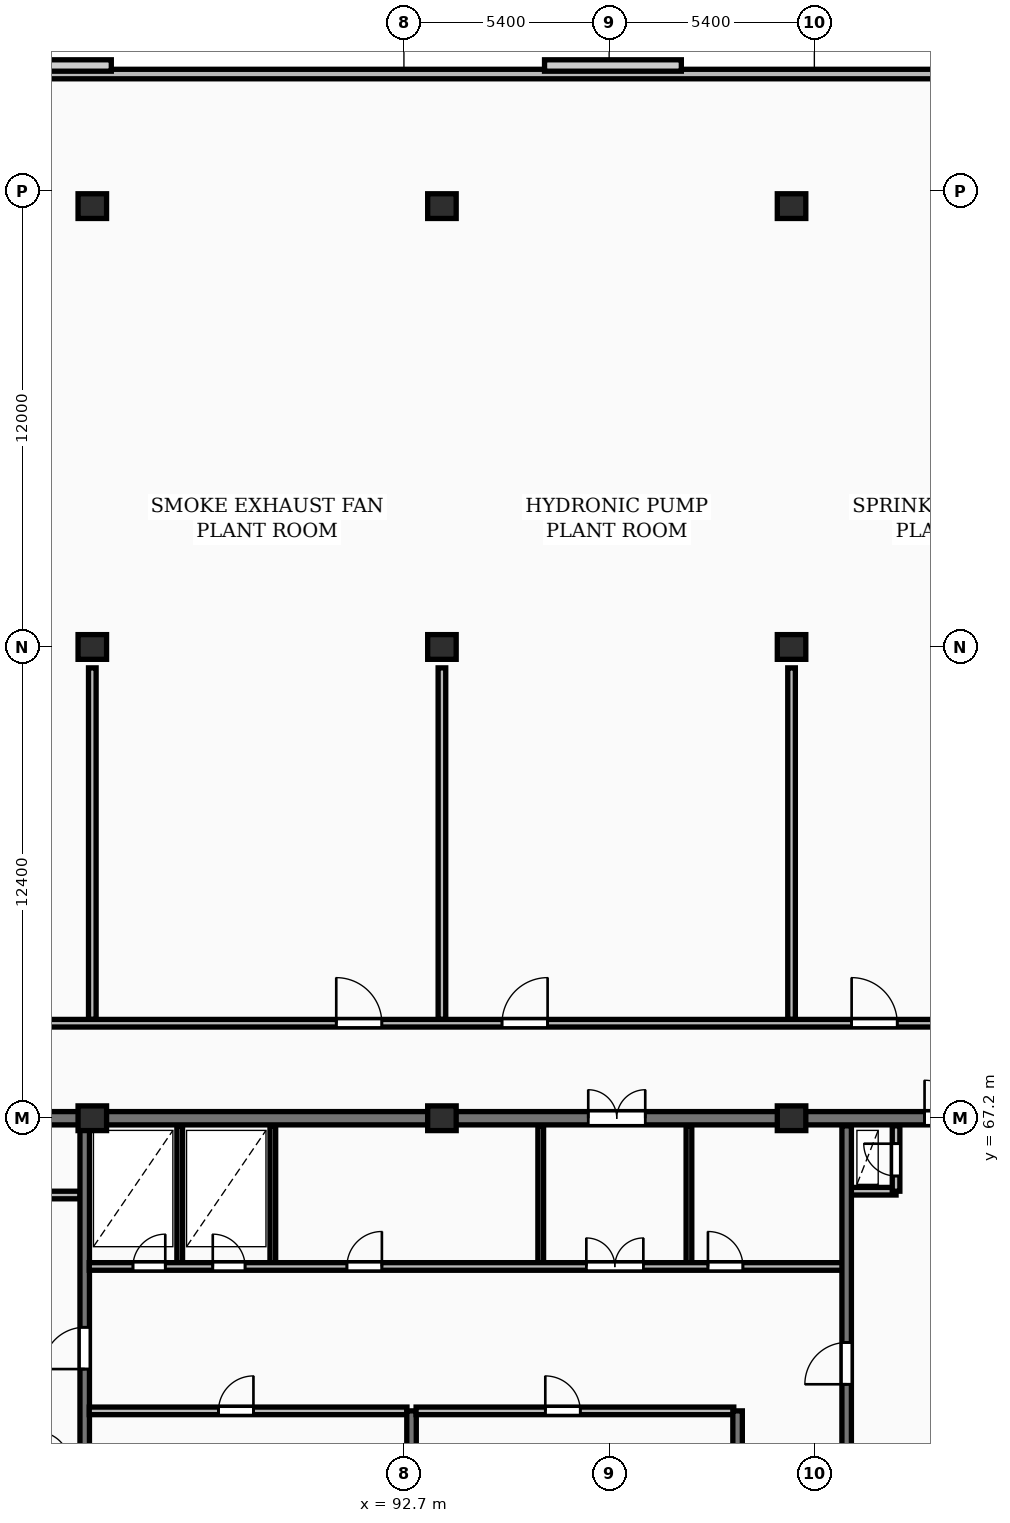
"""IFC4 building model, lengths in metres.
Left out: names, types, materials, properties, quantities, classifications, styles, units other than length and angle.
Written with IfcOpenShell. Run it as: python <this file> out.ifc"""

import sys

from ifc_helpers import new_model, si_unit, direction, frame, frame_2d, origin, origin_2d, place, context, subcontext, project, spatial, rectangle, extrude, element, fill, save


model = new_model("IFC4")
c1 = context("Model", 3, precision=1e-05, world=origin(), true_north=direction((0.0, 1.0)))
c2 = subcontext(c1, "Body", "Model", "MODEL_VIEW")
j1 = project(units=[si_unit("LENGTHUNIT", "METRE"), si_unit("PLANEANGLEUNIT", "RADIAN")], contexts=[c1])
p1 = place(None, origin())
s1 = spatial("IfcSite", under=j1, at=p1, CompositionType="ELEMENT")
p2 = place(p1, origin())
s2 = spatial("IfcBuilding", under=s1, at=p2, CompositionType="ELEMENT")
p3 = place(p2, frame((0.0, 0.0, 259.7)))
s3 = spatial("IfcBuildingStorey", under=s2, at=p3, CompositionType="ELEMENT", Elevation=259.7)
for number, where, z_axis, x_axis in (
    (1, (84.5, 67.2, 0.0), (0.0, 0.0, 1.0), (1.0, 0.0, 0.0)),
    (2, (84.5, 79.6, 0.0), (0.0, 0.0, 1.0), (1.0, 0.0, 0.0)),
    (3, (84.5, 91.2, 0.0), (0.0, 0.0, 1.0), (1.0, 0.0, 0.0)),
    (4, (93.7, 67.2, 0.0), (0.0, 0.0, 1.0), (1.0, 0.0, 0.0)),
    (5, (93.7, 79.6, 0.0), (0.0, 0.0, 1.0), (1.0, 0.0, 0.0)),
    (6, (93.7, 91.2, 0.0), (0.0, 0.0, 1.0), (1.0, 0.0, 0.0)),
    (7, (102.9, 67.2, 0.0), (0.0, 0.0, 1.0), (1.0, 0.0, 0.0)),
    (8, (102.9, 79.6, 0.0), (0.0, 0.0, 1.0), (1.0, 0.0, 0.0)),
    (9, (102.9, 91.2, 0.0), (0.0, 0.0, 1.0), (1.0, 0.0, 0.0)),
):
    element("IfcColumn", number, at=place(p3, frame(where, z_axis=z_axis, x_axis=x_axis)), inside=s3, PredefinedType="COLUMN", context=c2, shape_type="SweptSolid", body=[
        extrude(rectangle(XDim=0.75, YDim=0.65, at=origin_2d()), origin(), (0.0, 0.0, 1.0), 4.5),
    ])
p4 = place(p3, frame((128.4, 94.675, 0.0), z_axis=(0.0, 0.0, 1.0), x_axis=(-1.0, 0.0, 0.0)))
e10 = element("IfcWall", 10, at=p4, inside=s3, PredefinedType="SHEAR", context=c2, shape_type="SweptSolid", body=[
    extrude(rectangle(XDim=68.6, YDim=0.25, at=frame_2d((34.3, 0.0))), origin(), (0.0, 0.0, 1.0), 4.23),
])
p5 = place(p3, frame((75.95, 67.2, 0.0), z_axis=(0.0, 0.0, 1.0), x_axis=(1.0, 0.0, 0.0)))
e11 = element("IfcWall", 11, at=p5, inside=s3, PredefinedType="SHEAR", context=c2, shape_type="SweptSolid", body=[
    extrude(rectangle(XDim=36.3, YDim=0.35, at=frame_2d((18.15, 0.0))), origin(), (0.0, 0.0, 1.0), 4.5),
])
p6 = place(p5, frame((5.25, 0.0, 0.0)))
e12 = element("IfcOpeningElement", 12, at=p6, cuts=e11, PredefinedType="OPENING", context=c2, shape_type="SweptSolid", body=[
    extrude(rectangle(XDim=1.0, YDim=2.15, at=frame_2d((0.5, 1.075))), frame((0.0, 0.185, 0.0), z_axis=(0.0, -1.0, 0.0), x_axis=(1.0, 0.0, 0.0)), (0.0, 0.0, 1.0), 0.37),
])
p7 = place(p5, frame((21.6, 0.0, 0.0)))
e13 = element("IfcOpeningElement", 13, at=p7, cuts=e11, PredefinedType="OPENING", context=c2, shape_type="SweptSolid", body=[
    extrude(rectangle(XDim=1.5, YDim=2.2, at=frame_2d((0.75, 1.1))), frame((0.0, 0.185, 0.0), z_axis=(0.0, -1.0, 0.0), x_axis=(1.0, 0.0, 0.0)), (0.0, 0.0, 1.0), 0.37),
])
p8 = place(p5, frame((30.45, 0.0, 0.0)))
e14 = element("IfcOpeningElement", 14, at=p8, cuts=e11, PredefinedType="OPENING", context=c2, shape_type="SweptSolid", body=[
    extrude(rectangle(XDim=1.0, YDim=2.15, at=frame_2d((0.5, 1.075))), frame((0.0, 0.185, 0.0), z_axis=(0.0, -1.0, 0.0), x_axis=(1.0, 0.0, 0.0)), (0.0, 0.0, 1.0), 0.37),
])
p9 = place(p3, frame((79.79, 65.18, 0.0), z_axis=(0.0, 0.0, 1.0), x_axis=(1.0, 0.0, 0.0)))
e15 = element("IfcWall", 15, at=p9, inside=s3, PredefinedType="PARTITIONING", context=c2, shape_type="SweptSolid", body=[
    extrude(rectangle(XDim=4.39, YDim=0.2, at=frame_2d((2.195, 0.0))), origin(), (0.0, 0.0, 1.0), 4.23),
])
p10 = place(p9, frame((1.5, 0.0, 0.0)))
e16 = element("IfcOpeningElement", 16, at=p10, cuts=e15, PredefinedType="OPENING", context=c2, shape_type="SweptSolid", body=[
    extrude(rectangle(XDim=1.1, YDim=2.1, at=frame_2d((0.55, 1.05))), frame((0.0, 0.11, 0.0), z_axis=(0.0, -1.0, 0.0), x_axis=(1.0, 0.0, 0.0)), (0.0, 0.0, 1.0), 0.22),
])
p11 = place(p3, frame((84.3, 55.4, 0.0), z_axis=(0.0, 0.0, 1.0), x_axis=(0.0, 1.0, 0.0)))
e17 = element("IfcWall", 17, at=p11, inside=s3, PredefinedType="SHEAR", context=c2, shape_type="SweptSolid", body=[
    extrude(rectangle(XDim=11.6, YDim=0.25, at=frame_2d((5.8, 0.0))), origin(), (0.0, 0.0, 1.0), 4.5),
])
p12 = place(p11, frame((5.2, 0.0, 0.0)))
e18 = element("IfcOpeningElement", 18, at=p12, cuts=e17, PredefinedType="OPENING", context=c2, shape_type="SweptSolid", body=[
    extrude(rectangle(XDim=1.1, YDim=2.1, at=frame_2d((0.55, 1.05))), frame((0.0, 0.135, 0.0), z_axis=(0.0, -1.0, 0.0), x_axis=(1.0, 0.0, 0.0)), (0.0, 0.0, 1.0), 0.27),
])
p13 = place(p3, frame((84.42, 59.5, 0.0), z_axis=(0.0, 0.0, 1.0), x_axis=(1.0, 0.0, 0.0)))
e19 = element("IfcWall", 19, at=p13, inside=s3, PredefinedType="PARTITIONING", context=c2, shape_type="SweptSolid", body=[
    extrude(rectangle(XDim=8.36, YDim=0.2, at=frame_2d((4.18, 0.0))), origin(), (0.0, 0.0, 1.0), 4.23),
])
p14 = place(p13, frame((3.4, 0.0, 0.0)))
e20 = element("IfcOpeningElement", 20, at=p14, cuts=e19, PredefinedType="OPENING", context=c2, shape_type="SweptSolid", body=[
    extrude(rectangle(XDim=0.92, YDim=2.08, at=frame_2d((0.46, 1.04))), frame((0.0, 0.11, 0.0), z_axis=(0.0, -1.0, 0.0), x_axis=(1.0, 0.0, 0.0)), (0.0, 0.0, 1.0), 0.22),
])
p15 = place(p3, frame((92.9, 55.4, 0.0), z_axis=(0.0, 0.0, 1.0), x_axis=(0.0, 1.0, 0.0)))
e21 = element("IfcWall", 21, at=p15, inside=s3, PredefinedType="SHEAR", context=c2, shape_type="SweptSolid", body=[
    extrude(rectangle(XDim=4.1, YDim=0.25, at=frame_2d((2.05, 0.0))), origin(), (0.0, 0.0, 1.0), 4.5),
])
p16 = place(p3, frame((93.02, 59.5, 0.0), z_axis=(0.0, 0.0, 1.0), x_axis=(1.0, 0.0, 0.0)))
e22 = element("IfcWall", 22, at=p16, inside=s3, PredefinedType="PARTITIONING", context=c2, shape_type="SweptSolid", body=[
    extrude(rectangle(XDim=8.36, YDim=0.2, at=frame_2d((4.18, 0.0))), origin(), (0.0, 0.0, 1.0), 4.23),
])
p17 = place(p16, frame((3.4, 0.0, 0.0)))
e23 = element("IfcOpeningElement", 23, at=p17, cuts=e22, PredefinedType="OPENING", context=c2, shape_type="SweptSolid", body=[
    extrude(rectangle(XDim=0.92, YDim=2.08, at=frame_2d((0.46, 1.04))), frame((0.0, 0.11, 0.0), z_axis=(0.0, -1.0, 0.0), x_axis=(1.0, 0.0, 0.0)), (0.0, 0.0, 1.0), 0.22),
])
p18 = place(p3, frame((101.48, 55.4, 0.0), z_axis=(0.0, 0.0, 1.0), x_axis=(0.0, 1.0, 0.0)))
e24 = element("IfcWall", 24, at=p18, inside=s3, PredefinedType="SHEAR", context=c2, shape_type="SweptSolid", body=[
    extrude(rectangle(XDim=4.1, YDim=0.25, at=frame_2d((2.05, 0.0))), origin(), (0.0, 0.0, 1.0), 4.5),
])
for number, where, z_axis, x_axis in (
    (25, (86.8, 63.4, 0.0), (0.0, 0.0, 1.0), (0.0, 1.0, 0.0)),
    (26, (89.25, 63.4, 0.0), (0.0, 0.0, 1.0), (0.0, 1.0, 0.0)),
    (27, (96.3, 63.4, 0.0), (0.0, 0.0, 1.0), (0.0, 1.0, 0.0)),
    (28, (100.2, 63.4, 0.0), (0.0, 0.0, 1.0), (0.0, 1.0, 0.0)),
):
    element("IfcWall", number, at=place(p3, frame(where, z_axis=z_axis, x_axis=x_axis)), inside=s3, PredefinedType="PARTITIONING", context=c2, shape_type="SweptSolid", body=[
        extrude(rectangle(XDim=3.6, YDim=0.15, at=frame_2d((1.8, 0.0))), origin(), (0.0, 0.0, 1.0), 4.23),
    ])
p19 = place(p3, frame((84.42, 63.3, 0.0), z_axis=(0.0, 0.0, 1.0), x_axis=(1.0, 0.0, 0.0)))
e29 = element("IfcWall", 29, at=p19, inside=s3, PredefinedType="PARTITIONING", context=c2, shape_type="SweptSolid", body=[
    extrude(rectangle(XDim=19.83, YDim=0.2, at=frame_2d((9.915, 0.0))), origin(), (0.0, 0.0, 1.0), 4.23),
])
p20 = place(p19, frame((1.15, 0.0, 0.0)))
e30 = element("IfcOpeningElement", 30, at=p20, cuts=e29, PredefinedType="OPENING", context=c2, shape_type="SweptSolid", body=[
    extrude(rectangle(XDim=0.85, YDim=2.05, at=frame_2d((0.425, 1.025))), frame((0.0, 0.11, 0.0), z_axis=(0.0, -1.0, 0.0), x_axis=(1.0, 0.0, 0.0)), (0.0, 0.0, 1.0), 0.22),
])
p21 = place(p19, frame((3.25, 0.0, 0.0)))
e31 = element("IfcOpeningElement", 31, at=p21, cuts=e29, PredefinedType="OPENING", context=c2, shape_type="SweptSolid", body=[
    extrude(rectangle(XDim=0.85, YDim=2.05, at=frame_2d((0.425, 1.025))), frame((0.0, 0.11, 0.0), z_axis=(0.0, -1.0, 0.0), x_axis=(1.0, 0.0, 0.0)), (0.0, 0.0, 1.0), 0.22),
])
p22 = place(p19, frame((13.08, 0.0, 0.0)))
e32 = element("IfcOpeningElement", 32, at=p22, cuts=e29, PredefinedType="OPENING", context=c2, shape_type="SweptSolid", body=[
    extrude(rectangle(XDim=1.5, YDim=2.2, at=frame_2d((0.75, 1.1))), frame((0.0, 0.11, 0.0), z_axis=(0.0, -1.0, 0.0), x_axis=(1.0, 0.0, 0.0)), (0.0, 0.0, 1.0), 0.22),
])
p23 = place(p19, frame((6.78, 0.0, 0.0)))
e33 = element("IfcOpeningElement", 33, at=p23, cuts=e29, PredefinedType="OPENING", context=c2, shape_type="SweptSolid", body=[
    extrude(rectangle(XDim=0.92, YDim=2.08, at=frame_2d((0.46, 1.04))), frame((0.0, 0.11, 0.0), z_axis=(0.0, -1.0, 0.0), x_axis=(1.0, 0.0, 0.0)), (0.0, 0.0, 1.0), 0.22),
])
p24 = place(p19, frame((16.28, 0.0, 0.0)))
e34 = element("IfcOpeningElement", 34, at=p24, cuts=e29, PredefinedType="OPENING", context=c2, shape_type="SweptSolid", body=[
    extrude(rectangle(XDim=0.92, YDim=2.08, at=frame_2d((0.46, 1.04))), frame((0.0, 0.11, 0.0), z_axis=(0.0, -1.0, 0.0), x_axis=(1.0, 0.0, 0.0)), (0.0, 0.0, 1.0), 0.22),
])
p25 = place(p3, frame((104.45, 65.28, 0.0), z_axis=(0.0, 0.0, 1.0), x_axis=(1.0, 0.0, 0.0)))
e35 = element("IfcWall", 35, at=p25, inside=s3, PredefinedType="PARTITIONING", context=c2, shape_type="SweptSolid", body=[
    extrude(rectangle(XDim=1.2, YDim=0.2, at=frame_2d((0.6, 0.0))), origin(), (0.0, 0.0, 1.0), 4.23),
])
p26 = place(p3, frame((105.65, 65.28, 0.0), z_axis=(0.0, 0.0, 1.0), x_axis=(0.0, 1.0, 0.0)))
e36 = element("IfcWall", 36, at=p26, inside=s3, PredefinedType="PARTITIONING", context=c2, shape_type="SweptSolid", body=[
    extrude(rectangle(XDim=1.72, YDim=0.2, at=frame_2d((0.86, 0.0))), origin(), (0.0, 0.0, 1.0), 4.23),
])
p27 = place(p26, frame((0.4, 0.0, 0.0)))
e37 = element("IfcOpeningElement", 37, at=p27, cuts=e36, PredefinedType="OPENING", context=c2, shape_type="SweptSolid", body=[
    extrude(rectangle(XDim=0.85, YDim=2.05, at=frame_2d((0.425, 1.025))), frame((0.0, 0.11, 0.0), z_axis=(0.0, -1.0, 0.0), x_axis=(1.0, 0.0, 0.0)), (0.0, 0.0, 1.0), 0.22),
])
p28 = place(p3, frame((104.35, 58.4, 0.0), z_axis=(0.0, 0.0, 1.0), x_axis=(0.0, 1.0, 0.0)))
e38 = element("IfcWall", 38, at=p28, inside=s3, PredefinedType="SHEAR", context=c2, shape_type="SweptSolid", body=[
    extrude(rectangle(XDim=8.6, YDim=0.25, at=frame_2d((4.3, 0.0))), origin(), (0.0, 0.0, 1.0), 4.5),
])
p29 = place(p28, frame((1.8, 0.0, 0.0)))
e39 = element("IfcOpeningElement", 39, at=p29, cuts=e38, PredefinedType="OPENING", context=c2, shape_type="SweptSolid", body=[
    extrude(rectangle(XDim=1.1, YDim=2.1, at=frame_2d((0.55, 1.05))), frame((0.0, 0.135, 0.0), z_axis=(0.0, -1.0, 0.0), x_axis=(1.0, 0.0, 0.0)), (0.0, 0.0, 1.0), 0.27),
])
for number, where, z_axis, x_axis in (
    (40, (84.5, 69.8, 0.0), (0.0, 0.0, 1.0), (0.0, 1.0, 0.0)),
    (41, (93.7, 69.8, 0.0), (0.0, 0.0, 1.0), (0.0, 1.0, 0.0)),
    (42, (102.9, 69.8, 0.0), (0.0, 0.0, 1.0), (0.0, 1.0, 0.0)),
):
    element("IfcWall", number, at=place(p3, frame(where, z_axis=z_axis, x_axis=x_axis)), inside=s3, PredefinedType="PARTITIONING", context=c2, shape_type="SweptSolid", body=[
        extrude(rectangle(XDim=9.25, YDim=0.2, at=frame_2d((4.625, 0.0))), origin(), (0.0, 0.0, 1.0), 3.537),
    ])
p30 = place(p3, frame((59.8, 69.7, 0.0), z_axis=(0.0, 0.0, 1.0), x_axis=(1.0, 0.0, 0.0)))
e43 = element("IfcWall", 43, at=p30, inside=s3, PredefinedType="PARTITIONING", context=c2, shape_type="SweptSolid", body=[
    extrude(rectangle(XDim=68.6, YDim=0.2, at=frame_2d((34.3, 0.0))), origin(), (0.0, 0.0, 1.0), 4.23),
])
p31 = place(p30, frame((5.372, 0.0, 0.0)))
e44 = element("IfcOpeningElement", 44, at=p31, cuts=e43, PredefinedType="OPENING", context=c2, shape_type="SweptSolid", body=[
    extrude(rectangle(XDim=1.2, YDim=2.15, at=frame_2d((0.6, 1.075))), frame((0.0, 0.11, 0.0), z_axis=(0.0, -1.0, 0.0), x_axis=(1.0, 0.0, 0.0)), (0.0, 0.0, 1.0), 0.22),
])
p32 = place(p30, frame((13.514, 0.0, 0.0)))
e45 = element("IfcOpeningElement", 45, at=p32, cuts=e43, PredefinedType="OPENING", context=c2, shape_type="SweptSolid", body=[
    extrude(rectangle(XDim=1.2, YDim=2.15, at=frame_2d((0.6, 1.075))), frame((0.0, 0.11, 0.0), z_axis=(0.0, -1.0, 0.0), x_axis=(1.0, 0.0, 0.0)), (0.0, 0.0, 1.0), 0.22),
])
p33 = place(p30, frame((21.884, 0.0, 0.0)))
e46 = element("IfcOpeningElement", 46, at=p33, cuts=e43, PredefinedType="OPENING", context=c2, shape_type="SweptSolid", body=[
    extrude(rectangle(XDim=1.2, YDim=2.15, at=frame_2d((0.6, 1.075))), frame((0.0, 0.11, 0.0), z_axis=(0.0, -1.0, 0.0), x_axis=(1.0, 0.0, 0.0)), (0.0, 0.0, 1.0), 0.22),
])
p34 = place(p30, frame((31.119, 0.0, 0.0)))
e47 = element("IfcOpeningElement", 47, at=p34, cuts=e43, PredefinedType="OPENING", context=c2, shape_type="SweptSolid", body=[
    extrude(rectangle(XDim=1.2, YDim=2.15, at=frame_2d((0.6, 1.075))), frame((0.0, 0.11, 0.0), z_axis=(0.0, -1.0, 0.0), x_axis=(1.0, 0.0, 0.0)), (0.0, 0.0, 1.0), 0.22),
])
p35 = place(p30, frame((35.481, 0.0, 0.0)))
e48 = element("IfcOpeningElement", 48, at=p35, cuts=e43, PredefinedType="OPENING", context=c2, shape_type="SweptSolid", body=[
    extrude(rectangle(XDim=1.2, YDim=2.15, at=frame_2d((0.6, 1.075))), frame((0.0, 0.11, 0.0), z_axis=(0.0, -1.0, 0.0), x_axis=(1.0, 0.0, 0.0)), (0.0, 0.0, 1.0), 0.22),
])
p36 = place(p30, frame((44.681, 0.0, 0.0)))
e49 = element("IfcOpeningElement", 49, at=p36, cuts=e43, PredefinedType="OPENING", context=c2, shape_type="SweptSolid", body=[
    extrude(rectangle(XDim=1.2, YDim=2.15, at=frame_2d((0.6, 1.075))), frame((0.0, 0.11, 0.0), z_axis=(0.0, -1.0, 0.0), x_axis=(1.0, 0.0, 0.0)), (0.0, 0.0, 1.0), 0.22),
])
p37 = place(p30, frame((53.896, 0.0, 0.0)))
e50 = element("IfcOpeningElement", 50, at=p37, cuts=e43, PredefinedType="OPENING", context=c2, shape_type="SweptSolid", body=[
    extrude(rectangle(XDim=1.2, YDim=2.15, at=frame_2d((0.6, 1.075))), frame((0.0, 0.11, 0.0), z_axis=(0.0, -1.0, 0.0), x_axis=(1.0, 0.0, 0.0)), (0.0, 0.0, 1.0), 0.22),
])
p38 = place(p30, frame((62.118, 0.0, 0.0)))
e51 = element("IfcOpeningElement", 51, at=p38, cuts=e43, PredefinedType="OPENING", context=c2, shape_type="SweptSolid", body=[
    extrude(rectangle(XDim=1.2, YDim=2.15, at=frame_2d((0.6, 1.075))), frame((0.0, 0.11, 0.0), z_axis=(0.0, -1.0, 0.0), x_axis=(1.0, 0.0, 0.0)), (0.0, 0.0, 1.0), 0.22),
])
p39 = place(p7, origin())
e52 = element("IfcDoor", 52, at=p39, inside=s3, OperationType="DOUBLE_DOOR_SINGLE_SWING", PredefinedType="DOOR", context=c2, shape_type="SweptSolid", body=[
    extrude(rectangle(XDim=1.5, YDim=2.2, at=frame_2d((0.75, 1.1))), frame((0.0, 0.025, 0.0), z_axis=(0.0, -1.0, 0.0), x_axis=(1.0, 0.0, 0.0)), (0.0, 0.0, 1.0), 0.05),
])
fill(e13, e52)
p40 = place(p8, origin())
e53 = element("IfcDoor", 53, at=p40, inside=s3, OperationType="SINGLE_SWING_LEFT", PredefinedType="DOOR", context=c2, shape_type="SweptSolid", body=[
    extrude(rectangle(XDim=1.0, YDim=2.15, at=frame_2d((0.5, 1.075))), frame((0.0, 0.025, 0.0), z_axis=(0.0, -1.0, 0.0), x_axis=(1.0, 0.0, 0.0)), (0.0, 0.0, 1.0), 0.05),
])
fill(e14, e53)
p41 = place(p12, origin())
e54 = element("IfcDoor", 54, at=p41, inside=s3, OperationType="SINGLE_SWING_LEFT", PredefinedType="DOOR", context=c2, shape_type="SweptSolid", body=[
    extrude(rectangle(XDim=1.1, YDim=2.1, at=frame_2d((0.55, 1.05))), frame((0.0, 0.025, 0.0), z_axis=(0.0, -1.0, 0.0), x_axis=(1.0, 0.0, 0.0)), (0.0, 0.0, 1.0), 0.05),
])
fill(e18, e54)
p42 = place(p14, origin())
e55 = element("IfcDoor", 55, at=p42, inside=s3, OperationType="SINGLE_SWING_RIGHT", PredefinedType="DOOR", context=c2, shape_type="SweptSolid", body=[
    extrude(rectangle(XDim=0.92, YDim=2.08, at=frame_2d((0.46, 1.04))), frame((0.0, 0.025, 0.0), z_axis=(0.0, -1.0, 0.0), x_axis=(1.0, 0.0, 0.0)), (0.0, 0.0, 1.0), 0.05),
])
fill(e20, e55)
p43 = place(p17, origin())
e56 = element("IfcDoor", 56, at=p43, inside=s3, OperationType="SINGLE_SWING_LEFT", PredefinedType="DOOR", context=c2, shape_type="SweptSolid", body=[
    extrude(rectangle(XDim=0.92, YDim=2.08, at=frame_2d((0.46, 1.04))), frame((0.0, 0.025, 0.0), z_axis=(0.0, -1.0, 0.0), x_axis=(1.0, 0.0, 0.0)), (0.0, 0.0, 1.0), 0.05),
])
fill(e23, e56)
p44 = place(p20, origin())
e57 = element("IfcDoor", 57, at=p44, inside=s3, OperationType="SINGLE_SWING_RIGHT", PredefinedType="DOOR", context=c2, shape_type="SweptSolid", body=[
    extrude(rectangle(XDim=0.85, YDim=2.05, at=frame_2d((0.425, 1.025))), frame((0.0, 0.025, 0.0), z_axis=(0.0, -1.0, 0.0), x_axis=(1.0, 0.0, 0.0)), (0.0, 0.0, 1.0), 0.05),
])
fill(e30, e57)
p45 = place(p21, origin())
e58 = element("IfcDoor", 58, at=p45, inside=s3, OperationType="SINGLE_SWING_LEFT", PredefinedType="DOOR", context=c2, shape_type="SweptSolid", body=[
    extrude(rectangle(XDim=0.85, YDim=2.05, at=frame_2d((0.425, 1.025))), frame((0.0, 0.025, 0.0), z_axis=(0.0, -1.0, 0.0), x_axis=(1.0, 0.0, 0.0)), (0.0, 0.0, 1.0), 0.05),
])
fill(e31, e58)
p46 = place(p22, origin())
e59 = element("IfcDoor", 59, at=p46, inside=s3, OperationType="DOUBLE_DOOR_SINGLE_SWING", PredefinedType="DOOR", context=c2, shape_type="SweptSolid", body=[
    extrude(rectangle(XDim=1.5, YDim=2.2, at=frame_2d((0.75, 1.1))), frame((0.0, 0.025, 0.0), z_axis=(0.0, -1.0, 0.0), x_axis=(1.0, 0.0, 0.0)), (0.0, 0.0, 1.0), 0.05),
])
fill(e32, e59)
p47 = place(p23, origin())
e60 = element("IfcDoor", 60, at=p47, inside=s3, OperationType="SINGLE_SWING_RIGHT", PredefinedType="DOOR", context=c2, shape_type="SweptSolid", body=[
    extrude(rectangle(XDim=0.92, YDim=2.08, at=frame_2d((0.46, 1.04))), frame((0.0, 0.025, 0.0), z_axis=(0.0, -1.0, 0.0), x_axis=(1.0, 0.0, 0.0)), (0.0, 0.0, 1.0), 0.05),
])
fill(e33, e60)
p48 = place(p24, origin())
e61 = element("IfcDoor", 61, at=p48, inside=s3, OperationType="SINGLE_SWING_LEFT", PredefinedType="DOOR", context=c2, shape_type="SweptSolid", body=[
    extrude(rectangle(XDim=0.92, YDim=2.08, at=frame_2d((0.46, 1.04))), frame((0.0, 0.025, 0.0), z_axis=(0.0, -1.0, 0.0), x_axis=(1.0, 0.0, 0.0)), (0.0, 0.0, 1.0), 0.05),
])
fill(e34, e61)
p49 = place(p27, origin())
e62 = element("IfcDoor", 62, at=p49, inside=s3, OperationType="SINGLE_SWING_RIGHT", PredefinedType="DOOR", context=c2, shape_type="SweptSolid", body=[
    extrude(rectangle(XDim=0.85, YDim=2.05, at=frame_2d((0.425, 1.025))), frame((0.0, 0.025, 0.0), z_axis=(0.0, -1.0, 0.0), x_axis=(1.0, 0.0, 0.0)), (0.0, 0.0, 1.0), 0.05),
])
fill(e37, e62)
p50 = place(p29, origin())
e63 = element("IfcDoor", 63, at=p50, inside=s3, OperationType="SINGLE_SWING_LEFT", PredefinedType="DOOR", context=c2, shape_type="SweptSolid", body=[
    extrude(rectangle(XDim=1.1, YDim=2.1, at=frame_2d((0.55, 1.05))), frame((0.0, 0.025, 0.0), z_axis=(0.0, -1.0, 0.0), x_axis=(1.0, 0.0, 0.0)), (0.0, 0.0, 1.0), 0.05),
])
fill(e39, e63)
p51 = place(p34, origin())
e64 = element("IfcDoor", 64, at=p51, inside=s3, OperationType="SINGLE_SWING_LEFT", PredefinedType="DOOR", context=c2, shape_type="SweptSolid", body=[
    extrude(rectangle(XDim=1.2, YDim=2.15, at=frame_2d((0.6, 1.075))), frame((0.0, 0.025, 0.0), z_axis=(0.0, -1.0, 0.0), x_axis=(1.0, 0.0, 0.0)), (0.0, 0.0, 1.0), 0.05),
])
fill(e47, e64)
p52 = place(p35, origin())
e65 = element("IfcDoor", 65, at=p52, inside=s3, OperationType="SINGLE_SWING_RIGHT", PredefinedType="DOOR", context=c2, shape_type="SweptSolid", body=[
    extrude(rectangle(XDim=1.2, YDim=2.15, at=frame_2d((0.6, 1.075))), frame((0.0, 0.025, 0.0), z_axis=(0.0, -1.0, 0.0), x_axis=(1.0, 0.0, 0.0)), (0.0, 0.0, 1.0), 0.05),
])
fill(e48, e65)
p53 = place(p36, origin())
e66 = element("IfcDoor", 66, at=p53, inside=s3, OperationType="SINGLE_SWING_LEFT", PredefinedType="DOOR", context=c2, shape_type="SweptSolid", body=[
    extrude(rectangle(XDim=1.2, YDim=2.15, at=frame_2d((0.6, 1.075))), frame((0.0, 0.025, 0.0), z_axis=(0.0, -1.0, 0.0), x_axis=(1.0, 0.0, 0.0)), (0.0, 0.0, 1.0), 0.05),
])
fill(e49, e66)
save(model, sys.argv[1])
